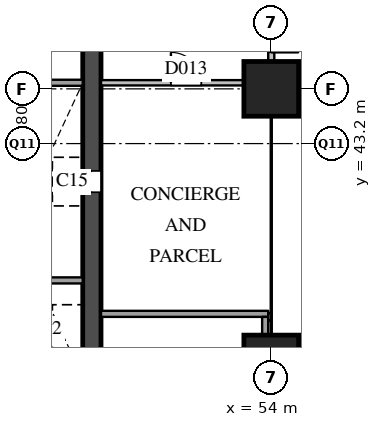
"""IFC4 building model, lengths in metres.
Left out: names, types, materials, properties, quantities, classifications, styles, units other than length and angle.
Written with IfcOpenShell. Run it as: python <this file> out.ifc"""

import sys

from ifc_helpers import new_model, si_unit, direction, frame, frame_2d, origin, origin_2d, place, context, subcontext, project, spatial, rectangle, extrude, element, fill, save


model = new_model("IFC4")
c1 = context("Model", 3, precision=1e-05, world=origin(), true_north=direction((0.0, 1.0)))
c2 = subcontext(c1, "Body", "Model", "MODEL_VIEW")
j1 = project(units=[si_unit("LENGTHUNIT", "METRE"), si_unit("PLANEANGLEUNIT", "RADIAN")], contexts=[c1])
p1 = place(None, origin())
s1 = spatial("IfcSite", under=j1, at=p1, CompositionType="ELEMENT")
p2 = place(p1, origin())
s2 = spatial("IfcBuilding", under=s1, at=p2, CompositionType="ELEMENT")
p3 = place(p2, origin())
s3 = spatial("IfcBuildingStorey", under=s2, at=p3, CompositionType="ELEMENT", Elevation=0.0)
for number, where, z_axis, x_axis in (
    (1, (54.0, 36.0, 0.0), (0.0, 0.0, 1.0), (1.0, 0.0, 0.0)),
    (2, (54.0, 45.0, 0.0), (0.0, 0.0, 1.0), (1.0, 0.0, 0.0)),
):
    element("IfcColumn", number, at=place(p3, frame(where, z_axis=z_axis, x_axis=x_axis)), inside=s3, PredefinedType="COLUMN", context=c2, shape_type="SweptSolid", body=[
        extrude(rectangle(XDim=1.8, YDim=1.8, at=origin_2d()), origin(), (0.0, 0.0, 1.0), 8.0),
    ])
p4 = place(p3, frame((54.0, 45.9, 0.0), z_axis=(0.0, 0.0, 1.0), x_axis=(0.0, 1.0, 0.0)))
e3 = element("IfcWall", 3, at=p4, inside=s3, PredefinedType="SOLIDWALL", context=c2, shape_type="SweptSolid", body=[
    extrude(rectangle(XDim=3.013, YDim=0.2, at=frame_2d((1.506, 0.0))), origin(), (0.0, 0.0, 1.0), 6.59),
])
p5 = place(p4, frame((2.1, 0.0, 0.0), z_axis=(0.0, 0.0, 1.0), x_axis=(-1.0, 0.0, 0.0)))
e4 = element("IfcOpeningElement", 4, at=p5, cuts=e3, PredefinedType="OPENING", context=c2, shape_type="SweptSolid", body=[
    extrude(rectangle(XDim=1.8, YDim=2.4, at=frame_2d((0.9, 1.2))), frame((0.0, 0.11, 0.0), z_axis=(0.0, -1.0, 0.0), x_axis=(1.0, 0.0, 0.0)), (0.0, 0.0, 1.0), 0.22),
])
p6 = place(p3, frame((48.1, 29.1, 0.0), z_axis=(0.0, 0.0, 1.0), x_axis=(0.0, 1.0, 0.0)))
e5 = element("IfcWall", 5, at=p6, inside=s3, PredefinedType="SHEAR", context=c2, shape_type="SweptSolid", body=[
    extrude(rectangle(XDim=20.3, YDim=0.6, at=frame_2d((10.15, 0.0))), origin(), (0.0, 0.0, 1.0), 7.59),
])
p7 = place(p6, frame((12.5, 0.0, 0.0)))
e6 = element("IfcOpeningElement", 6, at=p7, cuts=e5, PredefinedType="OPENING", context=c2, shape_type="SweptSolid", body=[
    extrude(rectangle(XDim=0.7, YDim=2.1, at=frame_2d((0.35, 1.05))), frame((0.0, 0.31, 0.0), z_axis=(0.0, -1.0, 0.0), x_axis=(1.0, 0.0, 0.0)), (0.0, 0.0, 1.0), 0.62),
])
p8 = place(p6, frame((4.0, 0.0, 0.0)))
e7 = element("IfcOpeningElement", 7, at=p8, cuts=e5, PredefinedType="OPENING", context=c2, shape_type="SweptSolid", body=[
    extrude(rectangle(XDim=1.0, YDim=2.1, at=frame_2d((0.5, 1.05))), frame((0.0, 0.31, 0.0), z_axis=(0.0, -1.0, 0.0), x_axis=(1.0, 0.0, 0.0)), (0.0, 0.0, 1.0), 0.62),
])
p9 = place(p3, frame((43.3, 38.7, 0.0), z_axis=(0.0, 0.0, 1.0), x_axis=(1.0, 0.0, 0.0)))
e8 = element("IfcWall", 8, at=p9, inside=s3, PredefinedType="SOLIDWALL", context=c2, shape_type="SweptSolid", body=[
    extrude(rectangle(XDim=4.5, YDim=0.2, at=frame_2d((2.25, 0.0))), origin(), (0.0, 0.0, 1.0), 7.59),
])
p10 = place(p3, frame((46.65, 45.2, 0.0), z_axis=(0.0, 0.0, 1.0), x_axis=(1.0, 0.0, 0.0)))
e9 = element("IfcWall", 9, at=p10, inside=s3, PredefinedType="SOLIDWALL", context=c2, shape_type="SweptSolid", body=[
    extrude(rectangle(XDim=1.15, YDim=0.2, at=frame_2d((0.575, 0.0))), origin(), (0.0, 0.0, 1.0), 7.59),
])
p11 = place(p3, frame((48.4, 37.6, 0.0), z_axis=(0.0, 0.0, 1.0), x_axis=(1.0, 0.0, 0.0)))
e10 = element("IfcWall", 10, at=p11, inside=s3, PredefinedType="SOLIDWALL", context=c2, shape_type="SweptSolid", body=[
    extrude(rectangle(XDim=5.5, YDim=0.2, at=frame_2d((2.75, 0.0))), origin(), (0.0, 0.0, 1.0), 7.59),
])
p12 = place(p3, frame((53.8, 32.3, 0.0), z_axis=(0.0, 0.0, 1.0), x_axis=(0.0, 1.0, 0.0)))
e11 = element("IfcWall", 11, at=p12, inside=s3, PredefinedType="SOLIDWALL", context=c2, shape_type="SweptSolid", body=[
    extrude(rectangle(XDim=5.2, YDim=0.2, at=frame_2d((2.6, 0.0))), origin(), (0.0, 0.0, 1.0), 6.59),
])
p13 = place(p12, frame((2.5, 0.0, 0.0), z_axis=(0.0, 0.0, 1.0), x_axis=(-1.0, 0.0, 0.0)))
e12 = element("IfcOpeningElement", 12, at=p13, cuts=e11, PredefinedType="OPENING", context=c2, shape_type="SweptSolid", body=[
    extrude(rectangle(XDim=1.8, YDim=2.4, at=frame_2d((0.9, 1.2))), frame((0.0, 0.11, 0.0), z_axis=(0.0, -1.0, 0.0), x_axis=(1.0, 0.0, 0.0)), (0.0, 0.0, 1.0), 0.22),
])
p14 = place(p3, frame((48.4, 45.2, 0.0), z_axis=(0.0, 0.0, 1.0), x_axis=(1.0, 0.0, 0.0)))
e13 = element("IfcWall", 13, at=p14, inside=s3, PredefinedType="PARTITIONING", context=c2, shape_type="SweptSolid", body=[
    extrude(rectangle(XDim=5.6, YDim=0.175, at=frame_2d((2.8, 0.0))), origin(), (0.0, 0.0, 1.0), 7.59),
])
p15 = place(p14, frame((2.3, 0.0, 0.0)))
e14 = element("IfcOpeningElement", 14, at=p15, cuts=e13, PredefinedType="OPENING", context=c2, shape_type="SweptSolid", body=[
    extrude(rectangle(XDim=1.0, YDim=2.1, at=frame_2d((0.5, 1.05))), frame((0.0, 0.097, 0.0), z_axis=(0.0, -1.0, 0.0), x_axis=(1.0, 0.0, 0.0)), (0.0, 0.0, 1.0), 0.195),
])
p16 = place(p3, frame((53.9, 37.5, 0.0), z_axis=(0.0, 0.0, 1.0), x_axis=(1.0, 0.0, 0.0)))
e15 = element("IfcWall", 15, at=p16, inside=s3, PredefinedType="PARTITIONING", context=c2, shape_type="SweptSolid", body=[
    extrude(rectangle(XDim=0.1, YDim=0.25, at=frame_2d((0.05, 0.0))), origin(), (0.0, 0.0, 1.0), 6.59),
])
p17 = place(p7, origin())
e16 = element("IfcDoor", 16, at=p17, inside=s3, OperationType="SINGLE_SWING_RIGHT", PredefinedType="DOOR", context=c2, shape_type="SweptSolid", body=[
    extrude(rectangle(XDim=0.7, YDim=2.1, at=frame_2d((0.35, 1.05))), frame((0.0, 0.025, 0.0), z_axis=(0.0, -1.0, 0.0), x_axis=(1.0, 0.0, 0.0)), (0.0, 0.0, 1.0), 0.05),
])
fill(e6, e16)
p18 = place(p15, origin())
e17 = element("IfcDoor", 17, at=p18, inside=s3, OperationType="SINGLE_SWING_LEFT", PredefinedType="DOOR", context=c2, shape_type="SweptSolid", body=[
    extrude(rectangle(XDim=1.0, YDim=2.1, at=frame_2d((0.5, 1.05))), frame((0.0, 0.025, 0.0), z_axis=(0.0, -1.0, 0.0), x_axis=(1.0, 0.0, 0.0)), (0.0, 0.0, 1.0), 0.05),
])
fill(e14, e17)
save(model, sys.argv[1])
